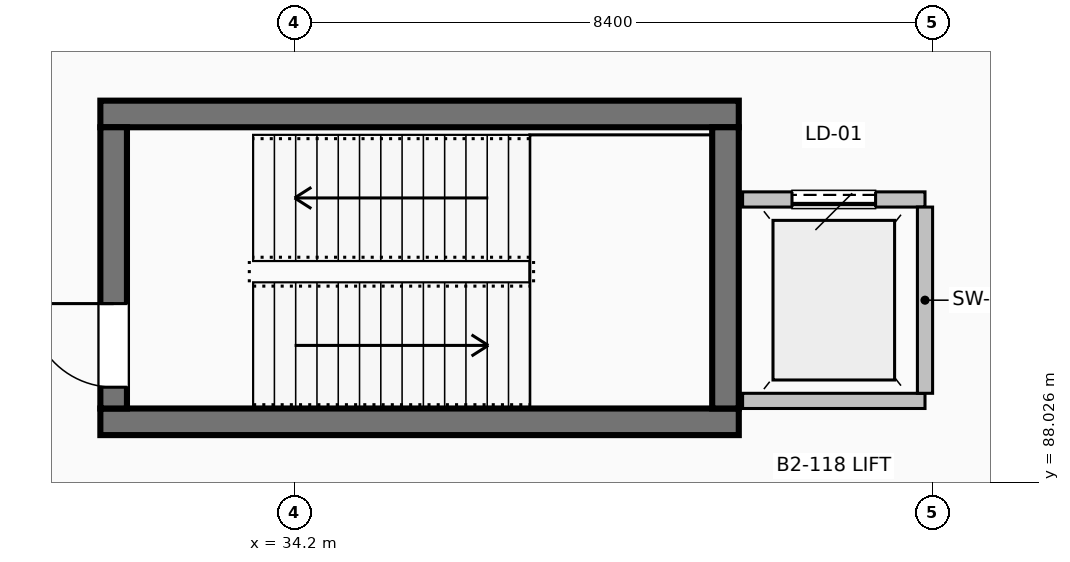
"""IFC4 building model, lengths in metres.
Left out: names, types, materials, properties, quantities, classifications, styles, units other than length and angle.
Written with IfcOpenShell. Run it as: python <this file> out.ifc"""

import sys

from ifc_helpers import new_model, si_unit, direction, frame, frame_2d, origin, place, context, subcontext, project, spatial, rectangle, extrude, element, fill, save


model = new_model("IFC4")
c1 = context("Model", 3, precision=1e-05, world=origin(), true_north=direction((0.0, 1.0)))
c2 = subcontext(c1, "Body", "Model", "MODEL_VIEW")
j1 = project(units=[si_unit("LENGTHUNIT", "METRE"), si_unit("PLANEANGLEUNIT", "RADIAN")], contexts=[c1])
p1 = place(None, origin())
s1 = spatial("IfcSite", under=j1, at=p1, CompositionType="ELEMENT")
p2 = place(p1, origin())
s2 = spatial("IfcBuilding", under=s1, at=p2, CompositionType="ELEMENT")
p3 = place(p2, frame((0.0, 0.0, -9.6)))
s3 = spatial("IfcBuildingStorey", under=s2, at=p3, CompositionType="ELEMENT", Elevation=-9.6)
for number, where, z_axis, x_axis in (
    (1, (31.65, 88.825, 0.0), (0.0, 0.0, 1.0), (1.0, 0.0, 0.0)),
    (2, (40.05, 92.875, 0.0), (0.0, 0.0, 1.0), (-1.0, 0.0, 0.0)),
):
    element("IfcWall", number, at=place(p3, frame(where, z_axis=z_axis, x_axis=x_axis)), inside=s3, PredefinedType="SHEAR", context=c2, shape_type="SweptSolid", body=[
        extrude(rectangle(XDim=8.4, YDim=0.35, at=frame_2d((4.2, 0.0))), origin(), (0.0, 0.0, 1.0), 4.5),
    ])
p4 = place(p3, frame((31.825, 89.0, 0.0), z_axis=(0.0, 0.0, 1.0), x_axis=(0.0, 1.0, 0.0)))
e3 = element("IfcWall", 3, at=p4, inside=s3, PredefinedType="SHEAR", context=c2, shape_type="SweptSolid", body=[
    extrude(rectangle(XDim=3.7, YDim=0.35, at=frame_2d((1.85, 0.0))), origin(), (0.0, 0.0, 1.0), 4.5),
])
p5 = place(p4, frame((0.28, 0.0, 0.0)))
e4 = element("IfcOpeningElement", 4, at=p5, cuts=e3, PredefinedType="OPENING", context=c2, shape_type="SweptSolid", body=[
    extrude(rectangle(XDim=1.1, YDim=2.08, at=frame_2d((0.55, 1.04))), frame((0.0, 0.185, 0.0), z_axis=(0.0, -1.0, 0.0), x_axis=(1.0, 0.0, 0.0)), (0.0, 0.0, 1.0), 0.37),
])
p6 = place(p3, frame((39.875, 92.7, 0.0), z_axis=(0.0, 0.0, 1.0), x_axis=(0.0, -1.0, 0.0)))
e5 = element("IfcWall", 5, at=p6, inside=s3, PredefinedType="SHEAR", context=c2, shape_type="SweptSolid", body=[
    extrude(rectangle(XDim=3.7, YDim=0.35, at=frame_2d((1.85, 0.0))), origin(), (0.0, 0.0, 1.0), 4.5),
])
p7 = place(p3, frame((40.1, 89.1, 0.0), z_axis=(0.0, 0.0, 1.0), x_axis=(1.0, 0.0, 0.0)))
e6 = element("IfcWall", 6, at=p7, inside=s3, PredefinedType="PARTITIONING", context=c2, shape_type="SweptSolid", body=[
    extrude(rectangle(XDim=2.4, YDim=0.2, at=frame_2d((1.2, 0.0))), origin(), (0.0, 0.0, 1.0), 4.492),
])
p8 = place(p3, frame((42.5, 91.75, 0.0), z_axis=(0.0, 0.0, 1.0), x_axis=(-1.0, 0.0, 0.0)))
e7 = element("IfcWall", 7, at=p8, inside=s3, PredefinedType="PARTITIONING", context=c2, shape_type="SweptSolid", body=[
    extrude(rectangle(XDim=2.4, YDim=0.2, at=frame_2d((1.2, 0.0))), origin(), (0.0, 0.0, 1.0), 4.492),
])
p9 = place(p8, frame((0.65, 0.0, 0.0)))
e8 = element("IfcOpeningElement", 8, at=p9, cuts=e7, PredefinedType="OPENING", context=c2, shape_type="SweptSolid", body=[
    extrude(rectangle(XDim=1.1, YDim=2.15, at=frame_2d((0.55, 1.075))), frame((0.0, 0.11, 0.0), z_axis=(0.0, -1.0, 0.0), x_axis=(1.0, 0.0, 0.0)), (0.0, 0.0, 1.0), 0.22),
])
p10 = place(p3, frame((42.5, 91.65, 0.0), z_axis=(0.0, 0.0, 1.0), x_axis=(0.0, -1.0, 0.0)))
e9 = element("IfcWall", 9, at=p10, inside=s3, PredefinedType="PARTITIONING", context=c2, shape_type="SweptSolid", body=[
    extrude(rectangle(XDim=2.45, YDim=0.2, at=frame_2d((1.225, 0.0))), origin(), (0.0, 0.0, 1.0), 3.592),
])
p11 = place(p5, origin())
e10 = element("IfcDoor", 10, at=p11, inside=s3, OperationType="SINGLE_SWING_RIGHT", PredefinedType="DOOR", context=c2, shape_type="SweptSolid", body=[
    extrude(rectangle(XDim=1.1, YDim=2.08, at=frame_2d((0.55, 1.04))), frame((0.0, 0.025, 0.0), z_axis=(0.0, -1.0, 0.0), x_axis=(1.0, 0.0, 0.0)), (0.0, 0.0, 1.0), 0.05),
])
fill(e4, e10)
p12 = place(p9, origin())
e11 = element("IfcDoor", 11, at=p12, inside=s3, OperationType="SLIDING_TO_LEFT", PredefinedType="DOOR", context=c2, shape_type="SweptSolid", body=[
    extrude(rectangle(XDim=1.1, YDim=2.15, at=frame_2d((0.55, 1.075))), frame((0.0, 0.025, 0.0), z_axis=(0.0, -1.0, 0.0), x_axis=(1.0, 0.0, 0.0)), (0.0, 0.0, 1.0), 0.05),
])
fill(e8, e11)
save(model, sys.argv[1])
